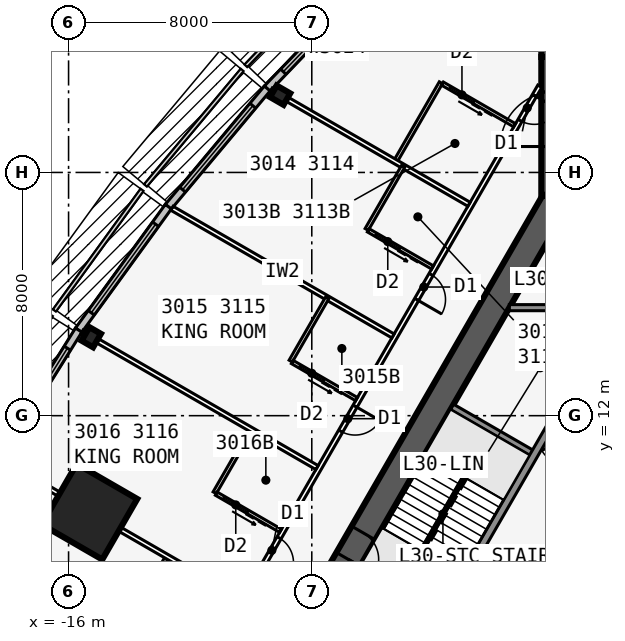
"""IFC4 building model, lengths in metres.
Left out: names, types, materials, properties, quantities, classifications, styles, units other than length and angle.
Written with IfcOpenShell. Run it as: python <this file> out.ifc"""

import sys

from ifc_helpers import new_model, si_unit, direction, frame, frame_2d, origin, origin_2d, place, context, subcontext, project, spatial, rectangle, i_section, extrude, element, fill, save


model = new_model("IFC4")
c1 = context("Model", 3, precision=1e-05, world=origin(), true_north=direction((0.0, 1.0)))
c2 = subcontext(c1, "Body", "Model", "MODEL_VIEW")
j1 = project(units=[si_unit("LENGTHUNIT", "METRE"), si_unit("PLANEANGLEUNIT", "RADIAN")], contexts=[c1])
p1 = place(None, origin())
s1 = spatial("IfcSite", under=j1, at=p1, CompositionType="ELEMENT")
p2 = place(p1, origin())
s2 = spatial("IfcBuilding", under=s1, at=p2, CompositionType="ELEMENT")
p3 = place(p2, frame((0.0, 0.0, 118.1)))
s3 = spatial("IfcBuildingStorey", under=s2, at=p3, CompositionType="ELEMENT", Elevation=118.1)
p4 = place(p3, frame((16.5, -9.526, 0.0), z_axis=(0.0, 0.0, 1.0), x_axis=(-0.499999749417, 0.866025548458, 0.0)))
e1 = element("IfcWall", 1, at=p4, inside=s3, PredefinedType="SHEAR", context=c2, shape_type="SweptSolid", body=[
    extrude(rectangle(XDim=33.0, YDim=0.9, at=frame_2d((16.5, 0.0))), origin(), (0.0, 0.0, 1.0), 3.4),
])
p5 = place(p4, frame((14.15, 0.0, 0.0)))
e2 = element("IfcOpeningElement", 2, at=p5, cuts=e1, PredefinedType="OPENING", context=c2, shape_type="SweptSolid", body=[
    extrude(rectangle(XDim=1.8, YDim=2.13, at=frame_2d((0.9, 1.065))), frame((0.0, 0.46, 0.0), z_axis=(0.0, -1.0, 0.0), x_axis=(1.0, 0.0, 0.0)), (0.0, 0.0, 1.0), 0.92),
])
p6 = place(p4, frame((12.6, 0.0, 0.0)))
e3 = element("IfcOpeningElement", 3, at=p6, cuts=e1, PredefinedType="OPENING", context=c2, shape_type="SweptSolid", body=[
    extrude(rectangle(XDim=1.0, YDim=2.13, at=frame_2d((0.5, 1.065))), frame((0.0, 0.46, 0.0), z_axis=(0.0, -1.0, 0.0), x_axis=(1.0, 0.0, 0.0)), (0.0, 0.0, 1.0), 0.92),
])
p7 = place(p3, frame((0.0, 19.052, 0.0), z_axis=(0.0, 0.0, 1.0), x_axis=(-0.499999749417, -0.866025548458, 0.0)))
e4 = element("IfcWall", 4, at=p7, inside=s3, PredefinedType="SHEAR", context=c2, shape_type="SweptSolid", body=[
    extrude(rectangle(XDim=33.0, YDim=0.9, at=frame_2d((16.5, 0.0))), origin(), (0.0, 0.0, 1.0), 3.4),
])
p8 = place(p7, frame((14.15, 0.0, 0.0)))
e5 = element("IfcOpeningElement", 5, at=p8, cuts=e4, PredefinedType="OPENING", context=c2, shape_type="SweptSolid", body=[
    extrude(rectangle(XDim=1.8, YDim=2.13, at=frame_2d((0.9, 1.065))), frame((0.0, 0.46, 0.0), z_axis=(0.0, -1.0, 0.0), x_axis=(1.0, 0.0, 0.0)), (0.0, 0.0, 1.0), 0.92),
])
p9 = place(p7, frame((12.6, 0.0, 0.0)))
e6 = element("IfcOpeningElement", 6, at=p9, cuts=e4, PredefinedType="OPENING", context=c2, shape_type="SweptSolid", body=[
    extrude(rectangle(XDim=1.0, YDim=2.13, at=frame_2d((0.5, 1.065))), frame((0.0, 0.46, 0.0), z_axis=(0.0, -1.0, 0.0), x_axis=(1.0, 0.0, 0.0)), (0.0, 0.0, 1.0), 0.92),
])
p10 = place(p3, frame((-0.062, 11.794, 0.0), z_axis=(0.0, 0.0, 1.0), x_axis=(-0.500006680225, -0.86602154692, 0.0)))
e7 = element("IfcWall", 7, at=p10, inside=s3, PredefinedType="SOLIDWALL", context=c2, shape_type="SweptSolid", body=[
    extrude(rectangle(XDim=7.733, YDim=0.25, at=frame_2d((3.866, 0.0))), origin(), (0.0, 0.0, 1.0), 3.235),
])
p11 = place(p3, frame((-0.679, 10.727, 0.0), z_axis=(0.0, 0.0, 1.0), x_axis=(-0.866022959057, 0.500004234368, 0.0)))
e8 = element("IfcWall", 8, at=p11, inside=s3, PredefinedType="SOLIDWALL", context=c2, shape_type="SweptSolid", body=[
    extrude(rectangle(XDim=3.125, YDim=0.2, at=frame_2d((1.562, 0.0))), origin(), (0.0, 0.0, 1.0), 3.235),
])
p12 = place(p3, frame((0.0, 19.052, 0.0), z_axis=(0.0, 0.0, 1.0), x_axis=(0.0, 1.0, 0.0)))
e9 = element("IfcWall", 9, at=p12, inside=s3, PredefinedType="SHEAR", context=c2, shape_type="SweptSolid", body=[
    extrude(rectangle(XDim=4.746, YDim=0.9, at=frame_2d((2.373, 0.0))), origin(), (0.0, 0.0, 1.0), 3.4),
])
p13 = place(p12, frame((1.8, 0.0, 0.0)))
e10 = element("IfcOpeningElement", 10, at=p13, cuts=e9, PredefinedType="OPENING", context=c2, shape_type="SweptSolid", body=[
    extrude(rectangle(XDim=1.8, YDim=2.13, at=frame_2d((0.9, 1.065))), frame((0.0, 0.46, 0.0), z_axis=(0.0, -1.0, 0.0), x_axis=(1.0, 0.0, 0.0)), (0.0, 0.0, 1.0), 0.92),
])
p14 = place(p3, frame((0.0, 23.799, 0.0), z_axis=(0.0, 0.0, 1.0), x_axis=(0.0, 1.0, 0.0)))
e11 = element("IfcWall", 11, at=p14, inside=s3, PredefinedType="SHEAR", context=c2, shape_type="SweptSolid", body=[
    extrude(rectangle(XDim=1.155, YDim=0.9, at=frame_2d((0.577, 0.0))), origin(), (0.0, 0.0, 1.0), 3.4),
])
for number, where, z_axis, x_axis in (
    (12, (-9.041, 22.541, 0.0), (0.0, 0.0, 1.0), (-0.5, -0.866, 0.0)),
    (13, (-15.254, 14.58, 0.0), (0.0, 0.0, 1.0), (-0.866, 0.5, 0.0)),
):
    element("IfcColumn", number, at=place(p3, frame(where, z_axis=z_axis, x_axis=x_axis)), inside=s3, PredefinedType="COLUMN", context=c2, shape_type="SweptSolid", body=[
        extrude(i_section(OverallWidth=0.437, OverallDepth=0.513, WebThickness=0.061, FlangeThickness=0.097, at=origin_2d()), origin(), (0.0, 0.0, 1.0), 3.4),
    ])
p15 = place(p3, frame((-15.312, 8.84, 0.0), z_axis=(0.0, 0.0, 1.0), x_axis=(-0.866025403784, 0.5, 0.0)))
e14 = element("IfcColumn", 14, at=p15, inside=s3, PredefinedType="COLUMN", context=c2, shape_type="SweptSolid", body=[
    extrude(rectangle(XDim=2.3, YDim=2.3, at=origin_2d()), origin(), (0.0, 0.0, 1.0), 3.4),
])
p16 = place(p3, frame((-5.91, 26.472, 0.0), z_axis=(0.0, 0.0, 1.0), x_axis=(-0.691719937936, -0.722165858693, 0.0)))
e15 = element("IfcWall", 15, at=p16, inside=s3, PredefinedType="STANDARD", context=c2, shape_type="SweptSolid", body=[
    extrude(rectangle(XDim=5.148, YDim=0.25, at=frame_2d((2.574, 0.0))), origin(), (0.0, 0.0, 1.0), 3.235),
])
p17 = place(p16, frame((0.774, 0.0, 0.45)))
e16 = element("IfcOpeningElement", 16, at=p17, cuts=e15, PredefinedType="OPENING", context=c2, shape_type="SweptSolid", body=[
    extrude(rectangle(XDim=3.6, YDim=2.4, at=frame_2d((1.8, 1.2))), frame((0.0, 0.135, 0.0), z_axis=(0.0, -1.0, 0.0), x_axis=(1.0, 0.0, 0.0)), (0.0, 0.0, 1.0), 0.27),
])
p18 = place(p3, frame((-9.465, 22.76, 0.0), z_axis=(0.0, 0.0, 1.0), x_axis=(-0.641810386606, -0.766863369607, 0.0)))
e17 = element("IfcWall", 17, at=p18, inside=s3, PredefinedType="STANDARD", context=c2, shape_type="SweptSolid", body=[
    extrude(rectangle(XDim=5.076, YDim=0.25, at=frame_2d((2.538, 0.0))), origin(), (0.0, 0.0, 1.0), 3.235),
])
p19 = place(p18, frame((0.738, 0.0, 0.45)))
e18 = element("IfcOpeningElement", 18, at=p19, cuts=e17, PredefinedType="OPENING", context=c2, shape_type="SweptSolid", body=[
    extrude(rectangle(XDim=3.6, YDim=2.4, at=frame_2d((1.8, 1.2))), frame((0.0, 0.135, 0.0), z_axis=(0.0, -1.0, 0.0), x_axis=(1.0, 0.0, 0.0)), (0.0, 0.0, 1.0), 0.27),
])
p20 = place(p3, frame((-12.718, 18.875, 0.0), z_axis=(0.0, 0.0, 1.0), x_axis=(-0.587669188412, -0.809101307001, 0.0)))
e19 = element("IfcWall", 19, at=p20, inside=s3, PredefinedType="STANDARD", context=c2, shape_type="SweptSolid", body=[
    extrude(rectangle(XDim=5.028, YDim=0.25, at=frame_2d((2.514, 0.0))), origin(), (0.0, 0.0, 1.0), 3.235),
])
p21 = place(p20, frame((0.714, 0.0, 0.45)))
e20 = element("IfcOpeningElement", 20, at=p21, cuts=e19, PredefinedType="OPENING", context=c2, shape_type="SweptSolid", body=[
    extrude(rectangle(XDim=3.6, YDim=2.4, at=frame_2d((1.8, 1.2))), frame((0.0, 0.135, 0.0), z_axis=(0.0, -1.0, 0.0), x_axis=(1.0, 0.0, 0.0)), (0.0, 0.0, 1.0), 0.27),
])
p22 = place(p3, frame((-15.667, 14.814, 0.0), z_axis=(0.0, 0.0, 1.0), x_axis=(-0.529990167382, -0.84800378683, 0.0)))
e21 = element("IfcWall", 21, at=p22, inside=s3, PredefinedType="STANDARD", context=c2, shape_type="SweptSolid", body=[
    extrude(rectangle(XDim=5.003, YDim=0.25, at=frame_2d((2.501, 0.0))), origin(), (0.0, 0.0, 1.0), 3.235),
])
p23 = place(p22, frame((0.701, 0.0, 0.45)))
e22 = element("IfcOpeningElement", 22, at=p23, cuts=e21, PredefinedType="OPENING", context=c2, shape_type="SweptSolid", body=[
    extrude(rectangle(XDim=3.6, YDim=2.4, at=frame_2d((1.8, 1.2))), frame((0.0, 0.135, 0.0), z_axis=(0.0, -1.0, 0.0), x_axis=(1.0, 0.0, 0.0)), (0.0, 0.0, 1.0), 0.27),
])
p24 = place(p3, frame((-0.5, 22.836, 0.0), z_axis=(0.0, 0.0, 1.0), x_axis=(-0.500001677587, -0.866024435227, 0.0)))
e23 = element("IfcWall", 23, at=p24, inside=s3, PredefinedType="PARTITIONING", context=c2, shape_type="SweptSolid", body=[
    extrude(rectangle(XDim=39.054, YDim=0.15, at=frame_2d((19.527, 0.0))), origin(), (0.0, 0.0, 1.0), 3.235),
])
p25 = place(p24, frame((0.352, 0.0, 0.0)))
e24 = element("IfcOpeningElement", 24, at=p25, cuts=e23, PredefinedType="OPENING", context=c2, shape_type="SweptSolid", body=[
    extrude(rectangle(XDim=0.95, YDim=2.13, at=frame_2d((0.475, 1.065))), frame((0.0, 0.085, 0.0), z_axis=(0.0, -1.0, 0.0), x_axis=(1.0, 0.0, 0.0)), (0.0, 0.0, 1.0), 0.17),
])
p26 = place(p24, frame((7.152, 0.0, 0.0)))
e25 = element("IfcOpeningElement", 25, at=p26, cuts=e23, PredefinedType="OPENING", context=c2, shape_type="SweptSolid", body=[
    extrude(rectangle(XDim=0.95, YDim=2.13, at=frame_2d((0.475, 1.065))), frame((0.0, 0.085, 0.0), z_axis=(0.0, -1.0, 0.0), x_axis=(1.0, 0.0, 0.0)), (0.0, 0.0, 1.0), 0.17),
])
p27 = place(p24, frame((12.152, 0.0, 0.0)))
e26 = element("IfcOpeningElement", 26, at=p27, cuts=e23, PredefinedType="OPENING", context=c2, shape_type="SweptSolid", body=[
    extrude(rectangle(XDim=0.95, YDim=2.13, at=frame_2d((0.475, 1.065))), frame((0.0, 0.085, 0.0), z_axis=(0.0, -1.0, 0.0), x_axis=(1.0, 0.0, 0.0)), (0.0, 0.0, 1.0), 0.17),
])
p28 = place(p24, frame((17.152, 0.0, 0.0)))
e27 = element("IfcOpeningElement", 27, at=p28, cuts=e23, PredefinedType="OPENING", context=c2, shape_type="SweptSolid", body=[
    extrude(rectangle(XDim=0.95, YDim=2.13, at=frame_2d((0.475, 1.065))), frame((0.0, 0.085, 0.0), z_axis=(0.0, -1.0, 0.0), x_axis=(1.0, 0.0, 0.0)), (0.0, 0.0, 1.0), 0.17),
])
p29 = place(p24, frame((22.752, 0.0, 0.0)))
e28 = element("IfcOpeningElement", 28, at=p29, cuts=e23, PredefinedType="OPENING", context=c2, shape_type="SweptSolid", body=[
    extrude(rectangle(XDim=0.95, YDim=2.13, at=frame_2d((0.475, 1.065))), frame((0.0, 0.085, 0.0), z_axis=(0.0, -1.0, 0.0), x_axis=(1.0, 0.0, 0.0)), (0.0, 0.0, 1.0), 0.17),
])
p30 = place(p24, frame((32.152, 0.0, 0.0)))
e29 = element("IfcOpeningElement", 29, at=p30, cuts=e23, PredefinedType="OPENING", context=c2, shape_type="SweptSolid", body=[
    extrude(rectangle(XDim=0.95, YDim=2.13, at=frame_2d((0.475, 1.065))), frame((0.0, 0.085, 0.0), z_axis=(0.0, -1.0, 0.0), x_axis=(1.0, 0.0, 0.0)), (0.0, 0.0, 1.0), 0.17),
])
p31 = place(p24, frame((37.752, 0.0, 0.0)))
e30 = element("IfcOpeningElement", 30, at=p31, cuts=e23, PredefinedType="OPENING", context=c2, shape_type="SweptSolid", body=[
    extrude(rectangle(XDim=0.95, YDim=2.13, at=frame_2d((0.475, 1.065))), frame((0.0, 0.085, 0.0), z_axis=(0.0, -1.0, 0.0), x_axis=(1.0, 0.0, 0.0)), (0.0, 0.0, 1.0), 0.17),
])
p32 = place(p3, frame((-2.829, 18.954, 0.0), z_axis=(0.0, 0.0, 1.0), x_axis=(-0.866015739374, 0.500016738876, 0.0)))
e31 = element("IfcWall", 31, at=p32, inside=s3, PredefinedType="PARTITIONING", context=c2, shape_type="SweptSolid", body=[
    extrude(rectangle(XDim=7.516, YDim=0.15, at=frame_2d((3.758, 0.0))), origin(), (0.0, 0.0, 1.0), 2.389),
])
p33 = place(p3, frame((-5.329, 14.623, 0.0), z_axis=(0.0, 0.0, 1.0), x_axis=(-0.866011723728, 0.500023693804, 0.0)))
e32 = element("IfcWall", 32, at=p33, inside=s3, PredefinedType="PARTITIONING", context=c2, shape_type="SweptSolid", body=[
    extrude(rectangle(XDim=8.395, YDim=0.15, at=frame_2d((4.198, 0.0))), origin(), (0.0, 0.0, 1.0), 2.389),
])
p34 = place(p3, frame((-7.829, 10.293, 0.0), z_axis=(0.0, 0.0, 1.0), x_axis=(-0.866027015393, 0.499997208602, 0.0)))
e33 = element("IfcWall", 33, at=p34, inside=s3, PredefinedType="PARTITIONING", context=c2, shape_type="SweptSolid", body=[
    extrude(rectangle(XDim=8.922, YDim=0.15, at=frame_2d((4.461, 0.0))), origin(), (0.0, 0.0, 1.0), 2.389),
])
p35 = place(p3, frame((-10.329, 5.963, 0.0), z_axis=(0.0, 0.0, 1.0), x_axis=(-0.866025170687, 0.500000403736, 0.0)))
e34 = element("IfcWall", 34, at=p35, inside=s3, PredefinedType="PARTITIONING", context=c2, shape_type="SweptSolid", body=[
    extrude(rectangle(XDim=9.099, YDim=0.15, at=frame_2d((4.549, 0.0))), origin(), (0.0, 0.0, 1.0), 2.389),
])
p36 = place(p3, frame((-3.753, 22.952, 0.0), z_axis=(0.0, 0.0, 1.0), x_axis=(-0.499990139034, -0.866031096941, 0.0)))
e35 = element("IfcWall", 35, at=p36, inside=s3, PredefinedType="PLUMBINGWALL", context=c2, shape_type="SweptSolid", body=[
    extrude(rectangle(XDim=3.0, YDim=0.12, at=frame_2d((1.5, 0.0))), origin(), (0.0, 0.0, 1.0), 3.235),
])
p37 = place(p3, frame((-1.329, 21.552, 0.0), z_axis=(0.0, 0.0, 1.0), x_axis=(-0.865997131366, 0.500048966069, 0.0)))
e36 = element("IfcWall", 36, at=p37, inside=s3, PredefinedType="PLUMBINGWALL", context=c2, shape_type="SweptSolid", body=[
    extrude(rectangle(XDim=2.74, YDim=0.12, at=frame_2d((1.37, 0.0))), origin(), (0.0, 0.0, 1.0), 3.235),
])
p38 = place(p37, frame((1.55, 0.0, 0.0)))
e37 = element("IfcOpeningElement", 37, at=p38, cuts=e36, PredefinedType="OPENING", context=c2, shape_type="SweptSolid", body=[
    extrude(rectangle(XDim=0.9, YDim=2.13, at=frame_2d((0.45, 1.065))), frame((0.0, 0.07, 0.0), z_axis=(0.0, -1.0, 0.0), x_axis=(1.0, 0.0, 0.0)), (0.0, 0.0, 1.0), 0.14),
])
p39 = place(p3, frame((-4.993, 20.204, 0.0), z_axis=(0.0, 0.0, 1.0), x_axis=(-0.500033551112, -0.866006032174, 0.0)))
e38 = element("IfcWall", 38, at=p39, inside=s3, PredefinedType="PLUMBINGWALL", context=c2, shape_type="SweptSolid", body=[
    extrude(rectangle(XDim=2.4, YDim=0.12, at=frame_2d((1.2, 0.0))), origin(), (0.0, 0.0, 1.0), 3.235),
])
p40 = place(p3, frame((-4.029, 16.875, 0.0), z_axis=(0.0, 0.0, 1.0), x_axis=(-0.865980627057, 0.500077547548, 0.0)))
e39 = element("IfcWall", 39, at=p40, inside=s3, PredefinedType="PLUMBINGWALL", context=c2, shape_type="SweptSolid", body=[
    extrude(rectangle(XDim=2.44, YDim=0.12, at=frame_2d((1.22, 0.0))), origin(), (0.0, 0.0, 1.0), 3.235),
])
p41 = place(p40, frame((1.25, 0.0, 0.0)))
e40 = element("IfcOpeningElement", 40, at=p41, cuts=e39, PredefinedType="OPENING", context=c2, shape_type="SweptSolid", body=[
    extrude(rectangle(XDim=0.9, YDim=2.13, at=frame_2d((0.45, 1.065))), frame((0.0, 0.07, 0.0), z_axis=(0.0, -1.0, 0.0), x_axis=(1.0, 0.0, 0.0)), (0.0, 0.0, 1.0), 0.14),
])
p42 = place(p3, frame((-7.493, 15.873, 0.0), z_axis=(0.0, 0.0, 1.0), x_axis=(-0.500077600433, -0.865980596518, 0.0)))
e41 = element("IfcWall", 41, at=p42, inside=s3, PredefinedType="PLUMBINGWALL", context=c2, shape_type="SweptSolid", body=[
    extrude(rectangle(XDim=2.4, YDim=0.12, at=frame_2d((1.2, 0.0))), origin(), (0.0, 0.0, 1.0), 3.235),
])
p43 = place(p3, frame((-6.529, 12.545, 0.0), z_axis=(0.0, 0.0, 1.0), x_axis=(-0.866023955769, 0.500002508028, 0.0)))
e42 = element("IfcWall", 42, at=p43, inside=s3, PredefinedType="PLUMBINGWALL", context=c2, shape_type="SweptSolid", body=[
    extrude(rectangle(XDim=2.44, YDim=0.12, at=frame_2d((1.22, 0.0))), origin(), (0.0, 0.0, 1.0), 3.235),
])
p44 = place(p43, frame((1.25, 0.0, 0.0)))
e43 = element("IfcOpeningElement", 43, at=p44, cuts=e42, PredefinedType="OPENING", context=c2, shape_type="SweptSolid", body=[
    extrude(rectangle(XDim=0.9, YDim=2.13, at=frame_2d((0.45, 1.065))), frame((0.0, 0.07, 0.0), z_axis=(0.0, -1.0, 0.0), x_axis=(1.0, 0.0, 0.0)), (0.0, 0.0, 1.0), 0.14),
])
p45 = place(p3, frame((-9.993, 11.543, 0.0), z_axis=(0.0, 0.0, 1.0), x_axis=(-0.500077600433, -0.865980596518, 0.0)))
e44 = element("IfcWall", 44, at=p45, inside=s3, PredefinedType="PLUMBINGWALL", context=c2, shape_type="SweptSolid", body=[
    extrude(rectangle(XDim=2.4, YDim=0.12, at=frame_2d((1.2, 0.0))), origin(), (0.0, 0.0, 1.0), 3.235),
])
p46 = place(p3, frame((-9.029, 8.215, 0.0), z_axis=(0.0, 0.0, 1.0), x_axis=(-0.866023955769, 0.500002508028, 0.0)))
e45 = element("IfcWall", 45, at=p46, inside=s3, PredefinedType="PLUMBINGWALL", context=c2, shape_type="SweptSolid", body=[
    extrude(rectangle(XDim=2.44, YDim=0.12, at=frame_2d((1.22, 0.0))), origin(), (0.0, 0.0, 1.0), 3.235),
])
p47 = place(p46, frame((1.25, 0.0, 0.0)))
e46 = element("IfcOpeningElement", 46, at=p47, cuts=e45, PredefinedType="OPENING", context=c2, shape_type="SweptSolid", body=[
    extrude(rectangle(XDim=0.9, YDim=2.13, at=frame_2d((0.45, 1.065))), frame((0.0, 0.07, 0.0), z_axis=(0.0, -1.0, 0.0), x_axis=(1.0, 0.0, 0.0)), (0.0, 0.0, 1.0), 0.14),
])
p48 = place(p3, frame((-12.753, 7.363, 0.0), z_axis=(0.0, 0.0, 1.0), x_axis=(-0.50002537861, -0.866010750942, 0.0)))
e47 = element("IfcWall", 47, at=p48, inside=s3, PredefinedType="PLUMBINGWALL", context=c2, shape_type="SweptSolid", body=[
    extrude(rectangle(XDim=3.0, YDim=0.12, at=frame_2d((1.5, 0.0))), origin(), (0.0, 0.0, 1.0), 3.235),
])
p49 = place(p3, frame((-1.501, 15.552, 0.0), z_axis=(0.0, 0.0, 1.0), x_axis=(1.0, 0.0, 0.0)))
e48 = element("IfcWall", 48, at=p49, inside=s3, PredefinedType="SOLIDWALL", context=c2, shape_type="SweptSolid", body=[
    extrude(rectangle(XDim=3.002, YDim=0.2, at=frame_2d((1.501, 0.0))), origin(), (0.0, 0.0, 1.0), 3.235),
])
p50 = place(p3, frame((-2.988, 9.978, 0.0), z_axis=(0.0, 0.0, 1.0), x_axis=(-0.499992232847, -0.866029888106, 0.0)))
e49 = element("IfcWall", 49, at=p50, inside=s3, PredefinedType="SOLIDWALL", context=c2, shape_type="SweptSolid", body=[
    extrude(rectangle(XDim=2.794, YDim=0.1, at=frame_2d((1.397, 0.0))), origin(), (0.0, 0.0, 1.0), 3.4),
])
p51 = place(p17, origin())
e50 = element("IfcWindow", 50, at=p51, inside=s3, PartitioningType="SINGLE_PANEL", PredefinedType="WINDOW", context=c2, shape_type="SweptSolid", body=[
    extrude(rectangle(XDim=3.6, YDim=2.4, at=frame_2d((1.8, 1.2))), frame((0.0, 0.03, 0.0), z_axis=(0.0, -1.0, 0.0), x_axis=(1.0, 0.0, 0.0)), (0.0, 0.0, 1.0), 0.06),
])
fill(e16, e50)
p52 = place(p19, origin())
e51 = element("IfcWindow", 51, at=p52, inside=s3, PartitioningType="SINGLE_PANEL", PredefinedType="WINDOW", context=c2, shape_type="SweptSolid", body=[
    extrude(rectangle(XDim=3.6, YDim=2.4, at=frame_2d((1.8, 1.2))), frame((0.0, 0.03, 0.0), z_axis=(0.0, -1.0, 0.0), x_axis=(1.0, 0.0, 0.0)), (0.0, 0.0, 1.0), 0.06),
])
fill(e18, e51)
p53 = place(p21, origin())
e52 = element("IfcWindow", 52, at=p53, inside=s3, PartitioningType="SINGLE_PANEL", PredefinedType="WINDOW", context=c2, shape_type="SweptSolid", body=[
    extrude(rectangle(XDim=3.6, YDim=2.4, at=frame_2d((1.8, 1.2))), frame((0.0, 0.03, 0.0), z_axis=(0.0, -1.0, 0.0), x_axis=(1.0, 0.0, 0.0)), (0.0, 0.0, 1.0), 0.06),
])
fill(e20, e52)
p54 = place(p23, origin())
e53 = element("IfcWindow", 53, at=p54, inside=s3, PartitioningType="SINGLE_PANEL", PredefinedType="WINDOW", context=c2, shape_type="SweptSolid", body=[
    extrude(rectangle(XDim=3.6, YDim=2.4, at=frame_2d((1.8, 1.2))), frame((0.0, 0.03, 0.0), z_axis=(0.0, -1.0, 0.0), x_axis=(1.0, 0.0, 0.0)), (0.0, 0.0, 1.0), 0.06),
])
fill(e22, e53)
p55 = place(p38, origin())
e54 = element("IfcDoor", 54, at=p55, inside=s3, OperationType="SLIDING_TO_LEFT", PredefinedType="DOOR", context=c2, shape_type="SweptSolid", body=[
    extrude(rectangle(XDim=0.9, YDim=2.13, at=frame_2d((0.45, 1.065))), frame((0.0, 0.025, 0.0), z_axis=(0.0, -1.0, 0.0), x_axis=(1.0, 0.0, 0.0)), (0.0, 0.0, 1.0), 0.05),
])
fill(e37, e54)
p56 = place(p25, origin())
e55 = element("IfcDoor", 55, at=p56, inside=s3, OperationType="SINGLE_SWING_LEFT", PredefinedType="DOOR", context=c2, shape_type="SweptSolid", body=[
    extrude(rectangle(XDim=0.95, YDim=2.13, at=frame_2d((0.475, 1.065))), frame((0.0, 0.025, 0.0), z_axis=(0.0, -1.0, 0.0), x_axis=(1.0, 0.0, 0.0)), (0.0, 0.0, 1.0), 0.05),
])
fill(e24, e55)
p57 = place(p41, origin())
e56 = element("IfcDoor", 56, at=p57, inside=s3, OperationType="SLIDING_TO_LEFT", PredefinedType="DOOR", context=c2, shape_type="SweptSolid", body=[
    extrude(rectangle(XDim=0.9, YDim=2.13, at=frame_2d((0.45, 1.065))), frame((0.0, 0.025, 0.0), z_axis=(0.0, -1.0, 0.0), x_axis=(1.0, 0.0, 0.0)), (0.0, 0.0, 1.0), 0.05),
])
fill(e40, e56)
p58 = place(p26, origin())
e57 = element("IfcDoor", 57, at=p58, inside=s3, OperationType="SINGLE_SWING_RIGHT", PredefinedType="DOOR", context=c2, shape_type="SweptSolid", body=[
    extrude(rectangle(XDim=0.95, YDim=2.13, at=frame_2d((0.475, 1.065))), frame((0.0, 0.025, 0.0), z_axis=(0.0, -1.0, 0.0), x_axis=(1.0, 0.0, 0.0)), (0.0, 0.0, 1.0), 0.05),
])
fill(e25, e57)
p59 = place(p44, origin())
e58 = element("IfcDoor", 58, at=p59, inside=s3, OperationType="SLIDING_TO_LEFT", PredefinedType="DOOR", context=c2, shape_type="SweptSolid", body=[
    extrude(rectangle(XDim=0.9, YDim=2.13, at=frame_2d((0.45, 1.065))), frame((0.0, 0.025, 0.0), z_axis=(0.0, -1.0, 0.0), x_axis=(1.0, 0.0, 0.0)), (0.0, 0.0, 1.0), 0.05),
])
fill(e43, e58)
p60 = place(p27, origin())
e59 = element("IfcDoor", 59, at=p60, inside=s3, OperationType="SINGLE_SWING_LEFT", PredefinedType="DOOR", context=c2, shape_type="SweptSolid", body=[
    extrude(rectangle(XDim=0.95, YDim=2.13, at=frame_2d((0.475, 1.065))), frame((0.0, 0.025, 0.0), z_axis=(0.0, -1.0, 0.0), x_axis=(1.0, 0.0, 0.0)), (0.0, 0.0, 1.0), 0.05),
])
fill(e26, e59)
p61 = place(p47, origin())
e60 = element("IfcDoor", 60, at=p61, inside=s3, OperationType="SLIDING_TO_LEFT", PredefinedType="DOOR", context=c2, shape_type="SweptSolid", body=[
    extrude(rectangle(XDim=0.9, YDim=2.13, at=frame_2d((0.45, 1.065))), frame((0.0, 0.025, 0.0), z_axis=(0.0, -1.0, 0.0), x_axis=(1.0, 0.0, 0.0)), (0.0, 0.0, 1.0), 0.05),
])
fill(e46, e60)
p62 = place(p28, origin())
e61 = element("IfcDoor", 61, at=p62, inside=s3, OperationType="SINGLE_SWING_RIGHT", PredefinedType="DOOR", context=c2, shape_type="SweptSolid", body=[
    extrude(rectangle(XDim=0.95, YDim=2.13, at=frame_2d((0.475, 1.065))), frame((0.0, 0.025, 0.0), z_axis=(0.0, -1.0, 0.0), x_axis=(1.0, 0.0, 0.0)), (0.0, 0.0, 1.0), 0.05),
])
fill(e27, e61)
p63 = place(p9, origin())
e62 = element("IfcDoor", 62, at=p63, inside=s3, OperationType="SINGLE_SWING_RIGHT", PredefinedType="DOOR", context=c2, shape_type="SweptSolid", body=[
    extrude(rectangle(XDim=1.0, YDim=2.13, at=frame_2d((0.5, 1.065))), frame((0.0, 0.025, 0.0), z_axis=(0.0, -1.0, 0.0), x_axis=(1.0, 0.0, 0.0)), (0.0, 0.0, 1.0), 0.05),
])
fill(e6, e62)
save(model, sys.argv[1])
